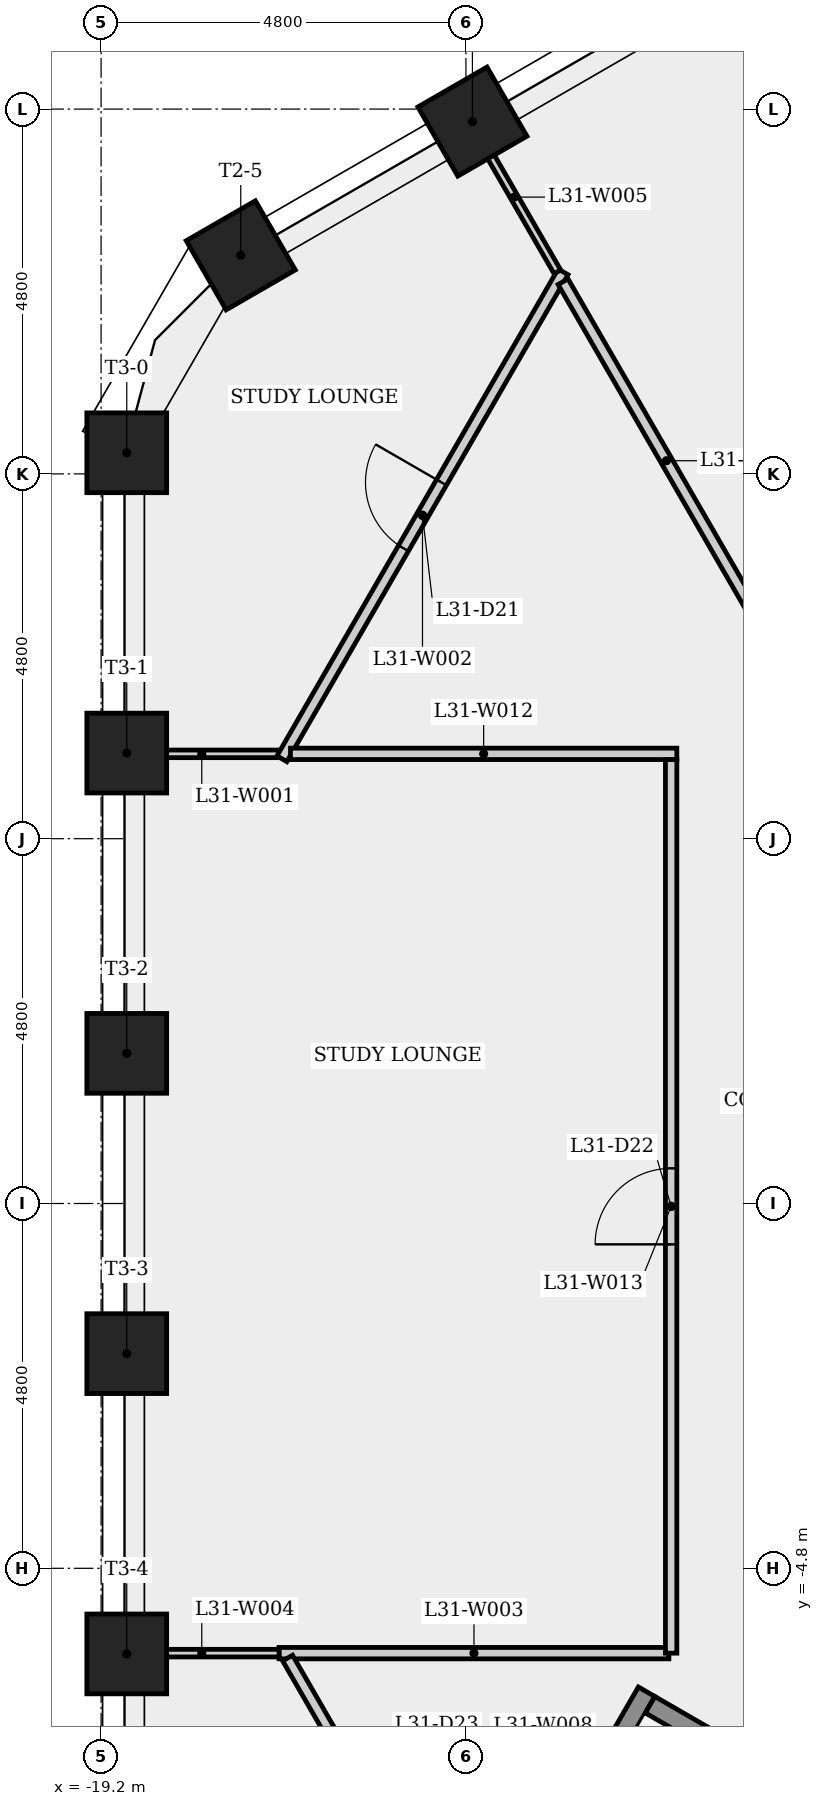
"""IFC4 building model, lengths in metres.
Left out: names, types, materials, properties, quantities, classifications, styles, units other than length and angle.
Written with IfcOpenShell. Run it as: python <this file> out.ifc"""

import sys

from ifc_helpers import new_model, si_unit, direction, frame, frame_2d, origin, origin_2d, place, context, subcontext, project, spatial, rectangle, extrude, element, fill, save


model = new_model("IFC4")
c1 = context("Model", 3, precision=1e-05, world=origin(), true_north=direction((0.0, 1.0)))
c2 = subcontext(c1, "Body", "Model", "MODEL_VIEW")
j1 = project(units=[si_unit("LENGTHUNIT", "METRE"), si_unit("PLANEANGLEUNIT", "RADIAN")], contexts=[c1])
p1 = place(None, origin())
s1 = spatial("IfcSite", under=j1, at=p1, CompositionType="ELEMENT")
p2 = place(p1, origin())
s2 = spatial("IfcBuilding", under=s1, at=p2, CompositionType="ELEMENT")
p3 = place(p2, frame((0.0, 0.0, 117.1)))
s3 = spatial("IfcBuildingStorey", under=s2, at=p3, CompositionType="ELEMENT", Elevation=117.1)
for number, where, z_axis, x_axis in (
    (1, (-14.314, 14.236, 0.0), (0.0, 0.0, 1.0), (-0.5, 0.866, 0.0)),
    (2, (-17.362, 12.476, 0.0), (0.0, 0.0, 1.0), (-0.5, 0.866, 0.0)),
    (3, (-18.862, 9.878, 0.0), (0.0, 0.0, 1.0), (-1.0, 0.0, 0.0)),
    (4, (-18.862, 5.927, 0.0), (0.0, 0.0, 1.0), (-1.0, 0.0, 0.0)),
    (5, (-18.862, 1.976, 0.0), (0.0, 0.0, 1.0), (-1.0, 0.0, 0.0)),
    (6, (-18.862, -1.976, 0.0), (0.0, 0.0, 1.0), (-1.0, 0.0, 0.0)),
    (7, (-18.862, -5.927, 0.0), (0.0, 0.0, 1.0), (-1.0, 0.0, 0.0)),
):
    element("IfcColumn", number, at=place(p3, frame(where, z_axis=z_axis, x_axis=x_axis)), inside=s3, PredefinedType="COLUMN", context=c2, shape_type="SweptSolid", body=[
        extrude(rectangle(XDim=1.05, YDim=1.05, at=origin_2d()), origin(), (0.0, 0.0, 1.0), 3.4),
    ])
p4 = place(p3, frame((-16.859, 5.917, 0.0), z_axis=(0.0, 0.0, 1.0), x_axis=(-1.0, 0.0, 0.0)))
e8 = element("IfcWall", 8, at=p4, inside=s3, PredefinedType="PARTITIONING", context=c2, shape_type="SweptSolid", body=[
    extrude(rectangle(XDim=2.033, YDim=0.1, at=frame_2d((1.017, 0.0))), origin(), (0.0, 0.0, 1.0), 3.0),
])
p5 = place(p3, frame((-16.821, 5.851, 0.0), z_axis=(0.0, 0.0, 1.0), x_axis=(0.500000483486, 0.866025124644, 0.0)))
e9 = element("IfcWall", 9, at=p5, inside=s3, PredefinedType="PARTITIONING", context=c2, shape_type="SweptSolid", body=[
    extrude(rectangle(XDim=7.398, YDim=0.15, at=frame_2d((3.699, 0.0))), origin(), (0.0, 0.0, 1.0), 3.0),
])
p6 = place(p5, frame((3.199, 0.0, 0.0)))
e10 = element("IfcOpeningElement", 10, at=p6, cuts=e9, PredefinedType="OPENING", context=c2, shape_type="SweptSolid", body=[
    extrude(rectangle(XDim=1.0, YDim=2.1, at=frame_2d((0.5, 1.05))), frame((0.0, 0.085, 0.0), z_axis=(0.0, -1.0, 0.0), x_axis=(1.0, 0.0, 0.0)), (0.0, 0.0, 1.0), 0.17),
])
p7 = place(p3, frame((-16.859, -5.917, 0.0), z_axis=(0.0, 0.0, 1.0), x_axis=(1.0, 0.0, 0.0)))
e11 = element("IfcWall", 11, at=p7, inside=s3, PredefinedType="PARTITIONING", context=c2, shape_type="SweptSolid", body=[
    extrude(rectangle(XDim=5.129, YDim=0.15, at=frame_2d((2.564, 0.0))), origin(), (0.0, 0.0, 1.0), 3.0),
])
p8 = place(p3, frame((-16.858, -5.917, 0.0), z_axis=(0.0, 0.0, 1.0), x_axis=(-1.0, 0.0, 0.0)))
e12 = element("IfcWall", 12, at=p8, inside=s3, PredefinedType="PARTITIONING", context=c2, shape_type="SweptSolid", body=[
    extrude(rectangle(XDim=2.034, YDim=0.1, at=frame_2d((1.017, 0.0))), origin(), (0.0, 0.0, 1.0), 3.0),
])
p9 = place(p3, frame((-14.333, 14.225, 0.0), z_axis=(0.0, 0.0, 1.0), x_axis=(0.500035767157, -0.866004752622, 0.0)))
e13 = element("IfcWall", 13, at=p9, inside=s3, PredefinedType="PARTITIONING", context=c2, shape_type="SweptSolid", body=[
    extrude(rectangle(XDim=2.271, YDim=0.1, at=frame_2d((1.135, 0.0))), origin(), (0.0, 0.0, 1.0), 3.0),
])
p10 = place(p3, frame((-14.219, -10.358, 0.0), z_axis=(0.0, 0.0, 1.0), x_axis=(-0.499973348067, 0.866040790738, 0.0)))
e14 = element("IfcWall", 14, at=p10, inside=s3, PredefinedType="PARTITIONING", context=c2, shape_type="SweptSolid", body=[
    extrude(rectangle(XDim=5.054, YDim=0.15, at=frame_2d((2.527, 0.0))), origin(), (0.0, 0.0, 1.0), 3.0),
])
p11 = place(p10, frame((2.082, 0.0, 0.0)))
e15 = element("IfcOpeningElement", 15, at=p11, cuts=e14, PredefinedType="OPENING", context=c2, shape_type="SweptSolid", body=[
    extrude(rectangle(XDim=1.0, YDim=2.1, at=frame_2d((0.5, 1.05))), frame((0.0, 0.085, 0.0), z_axis=(0.0, -1.0, 0.0), x_axis=(1.0, 0.0, 0.0)), (0.0, 0.0, 1.0), 0.17),
])
p12 = place(p3, frame((-13.648, -9.239, 0.0), z_axis=(0.0, 0.0, 1.0), x_axis=(0.500017246033, 0.866015446554, 0.0)))
e16 = element("IfcWall", 16, at=p12, inside=s3, PredefinedType="SHEAR", context=c2, shape_type="SweptSolid", body=[
    extrude(rectangle(XDim=3.25, YDim=0.25, at=frame_2d((1.625, 0.0))), origin(), (0.0, 0.0, 1.0), 3.0),
])
p13 = place(p3, frame((-13.122, 12.129, 0.0), z_axis=(0.0, 0.0, 1.0), x_axis=(0.500015120401, -0.866016673841, 0.0)))
e17 = element("IfcWall", 17, at=p13, inside=s3, PredefinedType="PARTITIONING", context=c2, shape_type="SweptSolid", body=[
    extrude(rectangle(XDim=5.44, YDim=0.15, at=frame_2d((2.72, 0.0))), origin(), (0.0, 0.0, 1.0), 3.0),
])
p14 = place(p3, frame((-11.977, -6.595, 0.0), z_axis=(0.0, 0.0, 1.0), x_axis=(0.866025499775, -0.499999833739, 0.0)))
e18 = element("IfcWall", 18, at=p14, inside=s3, PredefinedType="SHEAR", context=c2, shape_type="SweptSolid", body=[
    extrude(rectangle(XDim=6.4, YDim=0.25, at=frame_2d((3.2, 0.0))), origin(), (0.0, 0.0, 1.0), 3.0),
])
p15 = place(p14, frame((5.025, 0.0, 0.0)))
e19 = element("IfcOpeningElement", 19, at=p15, cuts=e18, PredefinedType="OPENING", context=c2, shape_type="SweptSolid", body=[
    extrude(rectangle(XDim=1.0, YDim=2.1, at=frame_2d((0.5, 1.05))), frame((0.0, 0.135, 0.0), z_axis=(0.0, -1.0, 0.0), x_axis=(1.0, 0.0, 0.0)), (0.0, 0.0, 1.0), 0.27),
])
p16 = place(p3, frame((-11.625, 5.917, 0.0), z_axis=(0.0, 0.0, 1.0), x_axis=(-1.0, 0.0, 0.0)))
e20 = element("IfcWall", 20, at=p16, inside=s3, PredefinedType="PARTITIONING", context=c2, shape_type="SweptSolid", body=[
    extrude(rectangle(XDim=5.084, YDim=0.15, at=frame_2d((2.542, 0.0))), origin(), (0.0, 0.0, 1.0), 3.0),
])
p17 = place(p3, frame((-11.7, -5.917, 0.0), z_axis=(0.0, 0.0, 1.0), x_axis=(0.0, 1.0, 0.0)))
e21 = element("IfcWall", 21, at=p17, inside=s3, PredefinedType="PARTITIONING", context=c2, shape_type="SweptSolid", body=[
    extrude(rectangle(XDim=11.758, YDim=0.15, at=frame_2d((5.879, 0.0))), origin(), (0.0, 0.0, 1.0), 3.0),
])
p18 = place(p17, frame((5.379, 0.0, 0.0)))
e22 = element("IfcOpeningElement", 22, at=p18, cuts=e21, PredefinedType="OPENING", context=c2, shape_type="SweptSolid", body=[
    extrude(rectangle(XDim=1.0, YDim=2.1, at=frame_2d((0.5, 1.05))), frame((0.0, 0.085, 0.0), z_axis=(0.0, -1.0, 0.0), x_axis=(1.0, 0.0, 0.0)), (0.0, 0.0, 1.0), 0.17),
])
p19 = place(p6, origin())
e23 = element("IfcDoor", 23, at=p19, inside=s3, OperationType="SINGLE_SWING_RIGHT", PredefinedType="DOOR", context=c2, shape_type="SweptSolid", body=[
    extrude(rectangle(XDim=1.0, YDim=2.1, at=frame_2d((0.5, 1.05))), frame((0.0, 0.025, 0.0), z_axis=(0.0, -1.0, 0.0), x_axis=(1.0, 0.0, 0.0)), (0.0, 0.0, 1.0), 0.05),
])
fill(e10, e23)
p20 = place(p18, origin())
e24 = element("IfcDoor", 24, at=p20, inside=s3, OperationType="SINGLE_SWING_LEFT", PredefinedType="DOOR", context=c2, shape_type="SweptSolid", body=[
    extrude(rectangle(XDim=1.0, YDim=2.1, at=frame_2d((0.5, 1.05))), frame((0.0, 0.025, 0.0), z_axis=(0.0, -1.0, 0.0), x_axis=(1.0, 0.0, 0.0)), (0.0, 0.0, 1.0), 0.05),
])
fill(e22, e24)
save(model, sys.argv[1])
